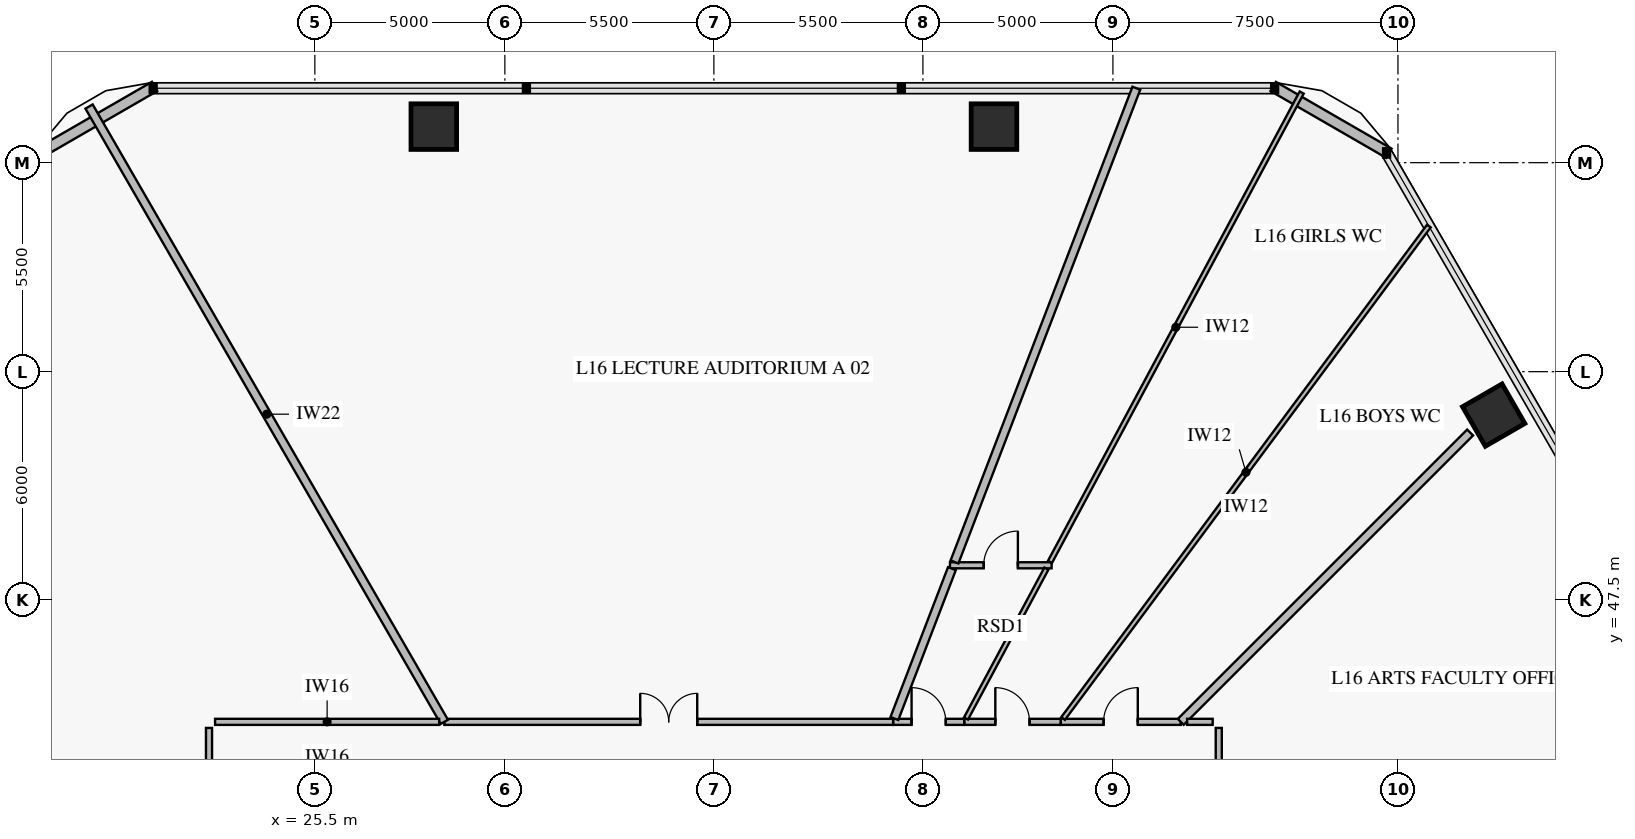
"""IFC4 building model, lengths in metres.
Left out: names, types, materials, properties, quantities, classifications, styles, units other than length and angle.
Written with IfcOpenShell. Run it as: python <this file> out.ifc"""

import sys

from ifc_helpers import new_model, si_unit, direction, frame, frame_2d, origin, origin_2d, place, context, subcontext, project, spatial, rectangle, extrude, element, fill, save


model = new_model("IFC4")
c1 = context("Model", 3, precision=1e-05, world=origin(), true_north=direction((0.0, 1.0)))
c2 = subcontext(c1, "Body", "Model", "MODEL_VIEW")
j1 = project(units=[si_unit("LENGTHUNIT", "METRE"), si_unit("PLANEANGLEUNIT", "RADIAN")], contexts=[c1])
p1 = place(None, origin())
s1 = spatial("IfcSite", under=j1, at=p1, CompositionType="ELEMENT")
p2 = place(p1, origin())
s2 = spatial("IfcBuilding", under=s1, at=p2, CompositionType="ELEMENT")
p3 = place(p2, frame((0.0, 0.0, 66.6)))
s3 = spatial("IfcBuildingStorey", under=s2, at=p3, CompositionType="ELEMENT", Elevation=66.6)
for number, where, z_axis, x_axis in (
    (1, (56.519, 52.357, 0.0), (0.0, 0.0, 1.0), (-0.5, 0.866, 0.0)),
    (2, (43.37, 59.948, 0.0), (0.0, 0.0, 1.0), (-1.0, 0.0, 0.0)),
    (3, (28.63, 59.948, 0.0), (0.0, 0.0, 1.0), (-1.0, 0.0, 0.0)),
):
    element("IfcColumn", number, at=place(p3, frame(where, z_axis=z_axis, x_axis=x_axis)), inside=s3, PredefinedType="COLUMN", context=c2, shape_type="SweptSolid", body=[
        extrude(rectangle(XDim=1.2, YDim=1.2, at=origin_2d()), origin(), (0.0, 0.0, 1.0), 3.92),
    ])
for number, where, z_axis, x_axis in (
    (4, (18.239, 59.249, 0.0), (0.0, 0.0, 1.0), (0.866, 0.5, 0.0)),
    (5, (50.717, 61.006, 0.0), (0.0, 0.0, 1.0), (0.866, -0.5, 0.0)),
):
    element("IfcWall", number, at=place(p3, frame(where, z_axis=z_axis, x_axis=x_axis)), inside=s3, PredefinedType="SOLIDWALL", context=c2, shape_type="SweptSolid", body=[
        extrude(rectangle(XDim=3.515, YDim=0.28, at=frame_2d((1.757, 0.0))), origin(), (0.0, 0.0, 1.0), 3.92),
    ])
p4 = place(p3, frame((48.285, 44.285, 0.0), z_axis=(0.0, 0.0, 1.0), x_axis=(-1.0, 0.0, 0.0)))
e6 = element("IfcWall", 6, at=p4, inside=s3, PredefinedType="PARTITIONING", context=c2, shape_type="SweptSolid", body=[
    extrude(rectangle(XDim=3.161, YDim=0.16, at=frame_2d((1.581, 0.0))), origin(), (0.0, 0.0, 1.0), 3.22),
])
p5 = place(p4, frame((1.131, 0.0, 0.0)))
e7 = element("IfcOpeningElement", 7, at=p5, cuts=e6, PredefinedType="OPENING", context=c2, shape_type="SweptSolid", body=[
    extrude(rectangle(XDim=0.9, YDim=2.1, at=frame_2d((0.45, 1.05))), frame((0.0, 0.092, 0.0), z_axis=(0.0, -1.0, 0.0), x_axis=(1.0, 0.0, 0.0)), (0.0, 0.0, 1.0), 0.184),
])
p6 = place(p3, frame((45.124, 44.285, 0.0), z_axis=(0.0, 0.0, 1.0), x_axis=(-1.0, 0.0, 0.0)))
e8 = element("IfcWall", 8, at=p6, inside=s3, PredefinedType="PARTITIONING", context=c2, shape_type="SweptSolid", body=[
    extrude(rectangle(XDim=2.536, YDim=0.16, at=frame_2d((1.268, 0.0))), origin(), (0.0, 0.0, 1.0), 3.92),
])
p7 = place(p6, frame((0.818, 0.0, 0.0)))
e9 = element("IfcOpeningElement", 9, at=p7, cuts=e8, PredefinedType="OPENING", context=c2, shape_type="SweptSolid", body=[
    extrude(rectangle(XDim=0.9, YDim=2.1, at=frame_2d((0.45, 1.05))), frame((0.0, 0.092, 0.0), z_axis=(0.0, -1.0, 0.0), x_axis=(1.0, 0.0, 0.0)), (0.0, 0.0, 1.0), 0.184),
])
p8 = place(p3, frame((42.212, 48.405, 0.0), z_axis=(0.0, 0.0, 1.0), x_axis=(1.0, 0.0, 0.0)))
e10 = element("IfcWall", 10, at=p8, inside=s3, PredefinedType="PARTITIONING", context=c2, shape_type="SweptSolid", body=[
    extrude(rectangle(XDim=2.676, YDim=0.16, at=frame_2d((1.338, 0.0))), origin(), (0.0, 0.0, 1.0), 3.92),
])
p9 = place(p8, frame((0.888, 0.0, 0.0)))
e11 = element("IfcOpeningElement", 11, at=p9, cuts=e10, PredefinedType="OPENING", context=c2, shape_type="SweptSolid", body=[
    extrude(rectangle(XDim=0.9, YDim=2.1, at=frame_2d((0.45, 1.05))), frame((0.0, 0.092, 0.0), z_axis=(0.0, -1.0, 0.0), x_axis=(1.0, 0.0, 0.0)), (0.0, 0.0, 1.0), 0.184),
])
p10 = place(p3, frame((42.587, 44.285, 0.0), z_axis=(0.0, 0.0, 1.0), x_axis=(-1.0, 0.0, 0.0)))
e12 = element("IfcWall", 12, at=p10, inside=s3, PredefinedType="PARTITIONING", context=c2, shape_type="SweptSolid", body=[
    extrude(rectangle(XDim=1.871, YDim=0.16, at=frame_2d((0.936, 0.0))), origin(), (0.0, 0.0, 1.0), 3.92),
])
p11 = place(p10, frame((0.486, 0.0, 0.0)))
e13 = element("IfcOpeningElement", 13, at=p11, cuts=e12, PredefinedType="OPENING", context=c2, shape_type="SweptSolid", body=[
    extrude(rectangle(XDim=0.9, YDim=2.1, at=frame_2d((0.45, 1.05))), frame((0.0, 0.092, 0.0), z_axis=(0.0, -1.0, 0.0), x_axis=(1.0, 0.0, 0.0)), (0.0, 0.0, 1.0), 0.184),
])
p12 = place(p3, frame((40.716, 44.285, 0.0), z_axis=(0.0, 0.0, 1.0), x_axis=(-1.0, 0.0, 0.0)))
e14 = element("IfcWall", 14, at=p12, inside=s3, PredefinedType="PARTITIONING", context=c2, shape_type="SweptSolid", body=[
    extrude(rectangle(XDim=11.809, YDim=0.16, at=frame_2d((5.904, 0.0))), origin(), (0.0, 0.0, 1.0), 3.22),
])
p13 = place(p12, frame((5.154, 0.0, 0.0)))
e15 = element("IfcOpeningElement", 15, at=p13, cuts=e14, PredefinedType="OPENING", context=c2, shape_type="SweptSolid", body=[
    extrude(rectangle(XDim=1.5, YDim=2.15, at=frame_2d((0.75, 1.075))), frame((0.0, 0.092, 0.0), z_axis=(0.0, -1.0, 0.0), x_axis=(1.0, 0.0, 0.0)), (0.0, 0.0, 1.0), 0.184),
])
p14 = place(p3, frame((22.715, 44.125, 0.0), z_axis=(0.0, 0.0, 1.0), x_axis=(0.0, -1.0, 0.0)))
e16 = element("IfcWall", 16, at=p14, inside=s3, PredefinedType="PARTITIONING", context=c2, shape_type="SweptSolid", body=[
    extrude(rectangle(XDim=10.021, YDim=0.16, at=frame_2d((5.01, 0.0))), origin(), (0.0, 0.0, 1.0), 3.22),
])
p15 = place(p14, frame((4.26, 0.0, 0.0)))
e17 = element("IfcOpeningElement", 17, at=p15, cuts=e16, PredefinedType="OPENING", context=c2, shape_type="SweptSolid", body=[
    extrude(rectangle(XDim=1.5, YDim=2.15, at=frame_2d((0.75, 1.075))), frame((0.0, 0.092, 0.0), z_axis=(0.0, -1.0, 0.0), x_axis=(1.0, 0.0, 0.0)), (0.0, 0.0, 1.0), 0.184),
])
p16 = place(p3, frame((49.285, 37.503, 0.0), z_axis=(0.0, 0.0, 1.0), x_axis=(0.0, 1.0, 0.0)))
e18 = element("IfcWall", 18, at=p16, inside=s3, PredefinedType="PARTITIONING", context=c2, shape_type="SweptSolid", body=[
    extrude(rectangle(XDim=6.622, YDim=0.16, at=frame_2d((3.311, 0.0))), origin(), (0.0, 0.0, 1.0), 3.92),
])
p17 = place(p16, frame((2.836, 0.0, 0.0)))
e19 = element("IfcOpeningElement", 19, at=p17, cuts=e18, PredefinedType="OPENING", context=c2, shape_type="SweptSolid", body=[
    extrude(rectangle(XDim=0.95, YDim=2.1, at=frame_2d((0.475, 1.05))), frame((0.0, 0.092, 0.0), z_axis=(0.0, -1.0, 0.0), x_axis=(1.0, 0.0, 0.0)), (0.0, 0.0, 1.0), 0.184),
])
p18 = place(p3, frame((48.285, 44.285, 0.0), z_axis=(0.0, 0.0, 1.0), x_axis=(0.707106781187, 0.707106781187, 0.0)))
e20 = element("IfcWall", 20, at=p18, inside=s3, PredefinedType="PARTITIONING", context=c2, shape_type="SweptSolid", body=[
    extrude(rectangle(XDim=10.768, YDim=0.22, at=frame_2d((5.384, 0.0))), origin(), (0.0, 0.0, 1.0), 3.22),
])
p19 = place(p3, frame((45.189, 44.373, 0.0), z_axis=(0.0, 0.0, 1.0), x_axis=(0.596225418148, 0.802817071788, 0.0)))
e21 = element("IfcWall", 21, at=p19, inside=s3, PredefinedType="PARTITIONING", context=c2, shape_type="SweptSolid", body=[
    extrude(rectangle(XDim=16.142, YDim=0.12, at=frame_2d((8.071, 0.0))), origin(), (0.0, 0.0, 1.0), 3.17),
])
p20 = place(p3, frame((42.634, 44.373, 0.0), z_axis=(0.0, 0.0, 1.0), x_axis=(0.472563527557, 0.881296608653, 0.0)))
e22 = element("IfcWall", 22, at=p20, inside=s3, PredefinedType="PARTITIONING", context=c2, shape_type="SweptSolid", body=[
    extrude(rectangle(XDim=4.475, YDim=0.12, at=frame_2d((2.238, 0.0))), origin(), (0.0, 0.0, 1.0), 3.92),
])
p21 = place(p3, frame((44.844, 48.493, 0.0), z_axis=(0.0, 0.0, 1.0), x_axis=(0.472553457508, 0.881302008279, 0.0)))
e23 = element("IfcWall", 23, at=p21, inside=s3, PredefinedType="PARTITIONING", context=c2, shape_type="SweptSolid", body=[
    extrude(rectangle(XDim=14.016, YDim=0.12, at=frame_2d((7.008, 0.0))), origin(), (0.0, 0.0, 1.0), 3.17),
])
p22 = place(p3, frame((40.75, 44.373, 0.0), z_axis=(0.0, 0.0, 1.0), x_axis=(0.358370990804, 0.933579259062, 0.0)))
e24 = element("IfcWall", 24, at=p22, inside=s3, PredefinedType="PARTITIONING", context=c2, shape_type="SweptSolid", body=[
    extrude(rectangle(XDim=4.224, YDim=0.22, at=frame_2d((2.112, 0.0))), origin(), (0.0, 0.0, 1.0), 3.92),
])
p23 = place(p3, frame((42.331, 48.493, 0.0), z_axis=(0.0, 0.0, 1.0), x_axis=(0.358372511013, 0.933578675501, 0.0)))
e25 = element("IfcWall", 25, at=p23, inside=s3, PredefinedType="PARTITIONING", context=c2, shape_type="SweptSolid", body=[
    extrude(rectangle(XDim=13.353, YDim=0.22, at=frame_2d((6.676, 0.0))), origin(), (0.0, 0.0, 1.0), 3.17),
])
p24 = place(p3, frame((28.907, 44.285, 0.0), z_axis=(0.0, 0.0, 1.0), x_axis=(-0.499994105362, 0.866028807028, 0.0)))
e26 = element("IfcWall", 26, at=p24, inside=s3, PredefinedType="PARTITIONING", context=c2, shape_type="SweptSolid", body=[
    extrude(rectangle(XDim=18.697, YDim=0.22, at=frame_2d((9.349, 0.0))), origin(), (0.0, 0.0, 1.0), 3.17),
])
p25 = place(p3, frame((28.771, 44.285, 0.0), z_axis=(0.0, 0.0, 1.0), x_axis=(-1.0, 0.0, 0.0)))
e27 = element("IfcWall", 27, at=p25, inside=s3, PredefinedType="PARTITIONING", context=c2, shape_type="SweptSolid", body=[
    extrude(rectangle(XDim=5.896, YDim=0.16, at=frame_2d((2.948, 0.0))), origin(), (0.0, 0.0, 1.0), 3.22),
])
p26 = place(p3, frame((49.125, 44.285, 0.0), z_axis=(0.0, 0.0, 1.0), x_axis=(-1.0, 0.0, 0.0)))
e28 = element("IfcWall", 28, at=p26, inside=s3, PredefinedType="PARTITIONING", context=c2, shape_type="SweptSolid", body=[
    extrude(rectangle(XDim=0.673, YDim=0.16, at=frame_2d((0.336, 0.0))), origin(), (0.0, 0.0, 1.0), 3.22),
])
p27 = place(p5, frame((0.9, 0.0, 0.0), z_axis=(0.0, 0.0, 1.0), x_axis=(-1.0, 0.0, 0.0)))
e29 = element("IfcDoor", 29, at=p27, inside=s3, OperationType="SINGLE_SWING_RIGHT", PredefinedType="DOOR", context=c2, shape_type="SweptSolid", body=[
    extrude(rectangle(XDim=0.9, YDim=2.1, at=frame_2d((0.45, 1.05))), frame((0.0, 0.025, 0.0), z_axis=(0.0, -1.0, 0.0), x_axis=(1.0, 0.0, 0.0)), (0.0, 0.0, 1.0), 0.05),
])
fill(e7, e29)
p28 = place(p7, frame((0.9, 0.0, 0.0), z_axis=(0.0, 0.0, 1.0), x_axis=(-1.0, 0.0, 0.0)))
e30 = element("IfcDoor", 30, at=p28, inside=s3, OperationType="SINGLE_SWING_LEFT", PredefinedType="DOOR", context=c2, shape_type="SweptSolid", body=[
    extrude(rectangle(XDim=0.9, YDim=2.1, at=frame_2d((0.45, 1.05))), frame((0.0, 0.025, 0.0), z_axis=(0.0, -1.0, 0.0), x_axis=(1.0, 0.0, 0.0)), (0.0, 0.0, 1.0), 0.05),
])
fill(e9, e30)
p29 = place(p9, origin())
e31 = element("IfcDoor", 31, at=p29, inside=s3, OperationType="SINGLE_SWING_RIGHT", PredefinedType="DOOR", context=c2, shape_type="SweptSolid", body=[
    extrude(rectangle(XDim=0.9, YDim=2.1, at=frame_2d((0.45, 1.05))), frame((0.0, 0.025, 0.0), z_axis=(0.0, -1.0, 0.0), x_axis=(1.0, 0.0, 0.0)), (0.0, 0.0, 1.0), 0.05),
])
fill(e11, e31)
p30 = place(p11, frame((0.9, 0.0, 0.0), z_axis=(0.0, 0.0, 1.0), x_axis=(-1.0, 0.0, 0.0)))
e32 = element("IfcDoor", 32, at=p30, inside=s3, OperationType="SINGLE_SWING_LEFT", PredefinedType="DOOR", context=c2, shape_type="SweptSolid", body=[
    extrude(rectangle(XDim=0.9, YDim=2.1, at=frame_2d((0.45, 1.05))), frame((0.0, 0.025, 0.0), z_axis=(0.0, -1.0, 0.0), x_axis=(1.0, 0.0, 0.0)), (0.0, 0.0, 1.0), 0.05),
])
fill(e13, e32)
p31 = place(p13, frame((1.5, 0.0, 0.0), z_axis=(0.0, 0.0, 1.0), x_axis=(-1.0, 0.0, 0.0)))
e33 = element("IfcDoor", 33, at=p31, inside=s3, OperationType="DOUBLE_DOOR_SINGLE_SWING", PredefinedType="DOOR", context=c2, shape_type="SweptSolid", body=[
    extrude(rectangle(XDim=1.5, YDim=2.15, at=frame_2d((0.75, 1.075))), frame((0.0, 0.025, 0.0), z_axis=(0.0, -1.0, 0.0), x_axis=(1.0, 0.0, 0.0)), (0.0, 0.0, 1.0), 0.05),
])
fill(e15, e33)
save(model, sys.argv[1])
